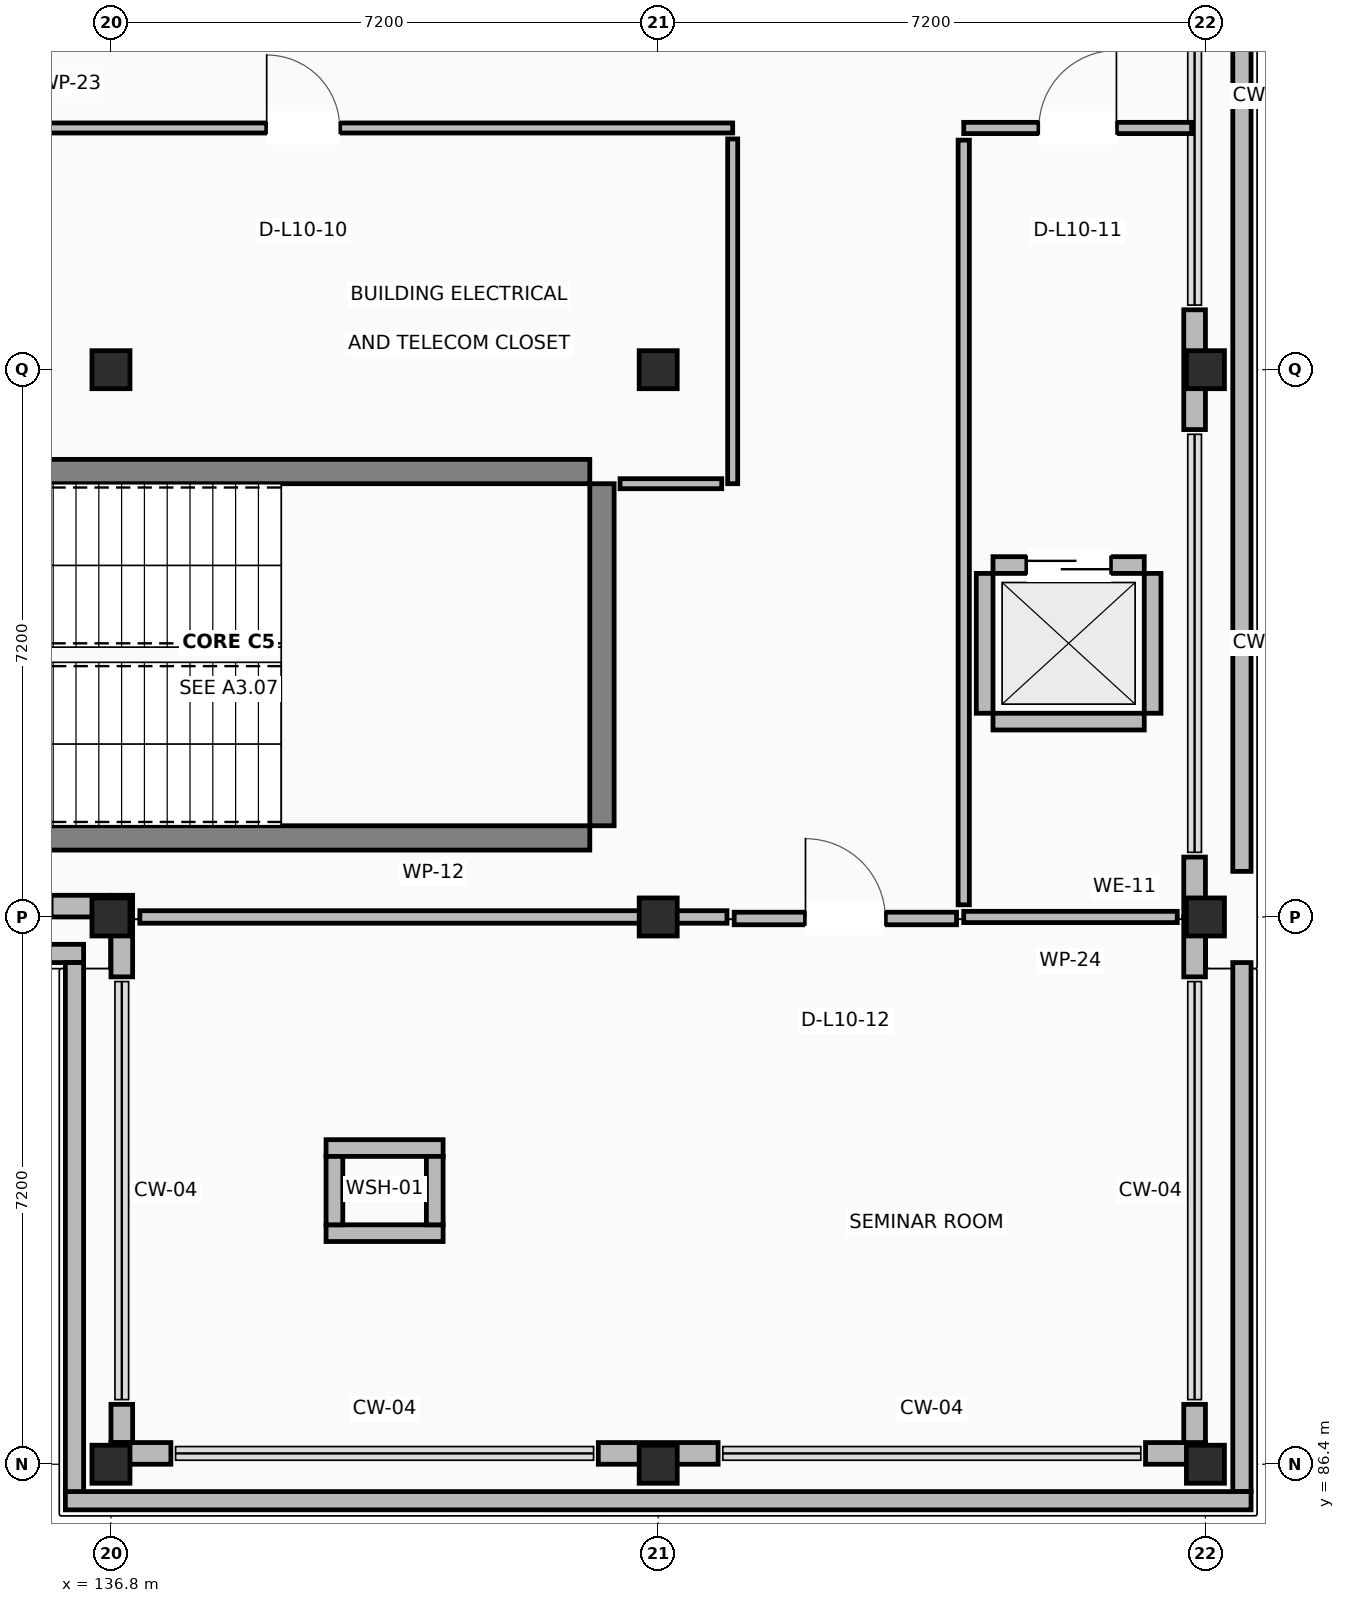
"""IFC4 building model, lengths in metres.
Left out: names, types, materials, properties, quantities, classifications, styles, units other than length and angle.
Written with IfcOpenShell. Run it as: python <this file> out.ifc"""

import sys

from ifc_helpers import new_model, si_unit, direction, frame, frame_2d, origin, origin_2d, place, context, subcontext, project, spatial, rectangle, extrude, element, fill, save


model = new_model("IFC4")
c1 = context("Model", 3, precision=1e-05, world=origin(), true_north=direction((0.0, 1.0)))
c2 = subcontext(c1, "Body", "Model", "MODEL_VIEW")
j1 = project(units=[si_unit("LENGTHUNIT", "METRE"), si_unit("PLANEANGLEUNIT", "RADIAN")], contexts=[c1])
p1 = place(None, origin())
s1 = spatial("IfcSite", under=j1, at=p1, CompositionType="ELEMENT")
p2 = place(p1, origin())
s2 = spatial("IfcBuilding", under=s1, at=p2, CompositionType="ELEMENT")
p3 = place(p2, frame((0.0, 0.0, 43.8)))
s3 = spatial("IfcBuildingStorey", under=s2, at=p3, CompositionType="ELEMENT", Elevation=43.8)
p4 = place(p3, frame((136.8, 86.4, 0.0), z_axis=(0.0, 0.0, 1.0), x_axis=(1.0, 0.0, 0.0)))
e1 = element("IfcColumn", 1, at=p4, inside=s3, PredefinedType="COLUMN", context=c2, shape_type="SweptSolid", body=[
    extrude(rectangle(XDim=0.5, YDim=0.5, at=origin_2d()), origin(), (0.0, 0.0, 1.0), 4.2),
])
for number, where, z_axis, x_axis in (
    (2, (136.8, 93.6, 0.0), (0.0, 0.0, 1.0), (1.0, 0.0, 0.0)),
    (3, (136.8, 100.8, 0.0), (0.0, 0.0, 1.0), (1.0, 0.0, 0.0)),
):
    element("IfcColumn", number, at=place(p3, frame(where, z_axis=z_axis, x_axis=x_axis)), inside=s3, PredefinedType="COLUMN", context=c2, shape_type="SweptSolid", body=[
        extrude(rectangle(XDim=0.5, YDim=0.5, at=origin_2d()), origin(), (0.0, 0.0, 1.0), 3.92),
    ])
p5 = place(p3, frame((144.0, 86.4, 0.0), z_axis=(0.0, 0.0, 1.0), x_axis=(1.0, 0.0, 0.0)))
e4 = element("IfcColumn", 4, at=p5, inside=s3, PredefinedType="COLUMN", context=c2, shape_type="SweptSolid", body=[
    extrude(rectangle(XDim=0.5, YDim=0.5, at=origin_2d()), origin(), (0.0, 0.0, 1.0), 4.2),
])
for number, where, z_axis, x_axis in (
    (5, (144.0, 93.6, 0.0), (0.0, 0.0, 1.0), (1.0, 0.0, 0.0)),
    (6, (144.0, 100.8, 0.0), (0.0, 0.0, 1.0), (1.0, 0.0, 0.0)),
):
    element("IfcColumn", number, at=place(p3, frame(where, z_axis=z_axis, x_axis=x_axis)), inside=s3, PredefinedType="COLUMN", context=c2, shape_type="SweptSolid", body=[
        extrude(rectangle(XDim=0.5, YDim=0.5, at=origin_2d()), origin(), (0.0, 0.0, 1.0), 3.92),
    ])
p6 = place(p3, frame((151.2, 86.4, 0.0), z_axis=(0.0, 0.0, 1.0), x_axis=(1.0, 0.0, 0.0)))
e7 = element("IfcColumn", 7, at=p6, inside=s3, PredefinedType="COLUMN", context=c2, shape_type="SweptSolid", body=[
    extrude(rectangle(XDim=0.5, YDim=0.5, at=origin_2d()), origin(), (0.0, 0.0, 1.0), 4.2),
])
for number, where, z_axis, x_axis in (
    (8, (151.2, 93.6, 0.0), (0.0, 0.0, 1.0), (1.0, 0.0, 0.0)),
    (9, (151.2, 100.8, 0.0), (0.0, 0.0, 1.0), (1.0, 0.0, 0.0)),
):
    element("IfcColumn", number, at=place(p3, frame(where, z_axis=z_axis, x_axis=x_axis)), inside=s3, PredefinedType="COLUMN", context=c2, shape_type="SweptSolid", body=[
        extrude(rectangle(XDim=0.5, YDim=0.5, at=origin_2d()), origin(), (0.0, 0.0, 1.0), 3.92),
    ])
for number, where, z_axis, x_axis in (
    (10, (133.6, 94.64, 0.0), (0.0, 0.0, 1.0), (1.0, 0.0, 0.0)),
    (11, (133.6, 99.46, 0.0), (0.0, 0.0, 1.0), (1.0, 0.0, 0.0)),
):
    element("IfcWall", number, at=place(p3, frame(where, z_axis=z_axis, x_axis=x_axis)), inside=s3, PredefinedType="SHEAR", context=c2, shape_type="SweptSolid", body=[
        extrude(rectangle(XDim=9.5, YDim=0.32, at=frame_2d((4.75, 0.0))), origin(), (0.0, 0.0, 1.0), 3.92),
    ])
p7 = place(p3, frame((143.26, 94.8, 0.0), z_axis=(0.0, 0.0, 1.0), x_axis=(0.0, 1.0, 0.0)))
e12 = element("IfcWall", 12, at=p7, inside=s3, PredefinedType="SHEAR", context=c2, shape_type="SweptSolid", body=[
    extrude(rectangle(XDim=4.5, YDim=0.32, at=frame_2d((2.25, 0.0))), origin(), (0.0, 0.0, 1.0), 3.92),
])
p8 = place(p3, frame((151.058, 93.6, 0.0), z_axis=(0.0, 0.0, 1.0), x_axis=(0.0, 1.0, 0.0)))
e13 = element("IfcWall", 13, at=p8, inside=s3, PredefinedType="STANDARD", context=c2, shape_type="SweptSolid", body=[
    extrude(rectangle(XDim=0.788, YDim=0.285, at=frame_2d((0.394, 0.0))), origin(), (0.0, 0.0, 1.0), 2.96),
])
p9 = place(p3, frame((151.058, 100.012, 0.0), z_axis=(0.0, 0.0, 1.0), x_axis=(0.0, 1.0, 0.0)))
e14 = element("IfcWall", 14, at=p9, inside=s3, PredefinedType="STANDARD", context=c2, shape_type="SweptSolid", body=[
    extrude(rectangle(XDim=1.576, YDim=0.285, at=frame_2d((0.788, 0.0))), origin(), (0.0, 0.0, 1.0), 2.96),
])
p10 = place(p3, frame((136.012, 93.742, 0.0), z_axis=(0.0, 0.0, 1.0), x_axis=(1.0, 0.0, 0.0)))
e15 = element("IfcWall", 15, at=p10, inside=s3, PredefinedType="STANDARD", context=c2, shape_type="SweptSolid", body=[
    extrude(rectangle(XDim=0.788, YDim=0.285, at=frame_2d((0.394, 0.0))), origin(), (0.0, 0.0, 1.0), 2.96),
])
p11 = place(p3, frame((136.942, 93.885, 0.0), z_axis=(0.0, 0.0, 1.0), x_axis=(0.0, -1.0, 0.0)))
e16 = element("IfcWall", 16, at=p11, inside=s3, PredefinedType="STANDARD", context=c2, shape_type="SweptSolid", body=[
    extrude(rectangle(XDim=1.073, YDim=0.285, at=frame_2d((0.537, 0.0))), origin(), (0.0, 0.0, 1.0), 2.96),
])
p12 = place(p3, frame((136.942, 87.188, 0.0), z_axis=(0.0, 0.0, 1.0), x_axis=(0.0, -1.0, 0.0)))
e17 = element("IfcWall", 17, at=p12, inside=s3, PredefinedType="STANDARD", context=c2, shape_type="SweptSolid", body=[
    extrude(rectangle(XDim=0.503, YDim=0.285, at=frame_2d((0.251, 0.0))), origin(), (0.0, 0.0, 1.0), 2.96),
])
p13 = place(p3, frame((136.8, 86.542, 0.0), z_axis=(0.0, 0.0, 1.0), x_axis=(1.0, 0.0, 0.0)))
e18 = element("IfcWall", 18, at=p13, inside=s3, PredefinedType="STANDARD", context=c2, shape_type="SweptSolid", body=[
    extrude(rectangle(XDim=0.788, YDim=0.285, at=frame_2d((0.394, 0.0))), origin(), (0.0, 0.0, 1.0), 2.96),
])
p14 = place(p3, frame((143.212, 86.542, 0.0), z_axis=(0.0, 0.0, 1.0), x_axis=(1.0, 0.0, 0.0)))
e19 = element("IfcWall", 19, at=p14, inside=s3, PredefinedType="STANDARD", context=c2, shape_type="SweptSolid", body=[
    extrude(rectangle(XDim=1.576, YDim=0.285, at=frame_2d((0.788, 0.0))), origin(), (0.0, 0.0, 1.0), 2.96),
])
p15 = place(p3, frame((150.412, 86.542, 0.0), z_axis=(0.0, 0.0, 1.0), x_axis=(1.0, 0.0, 0.0)))
e20 = element("IfcWall", 20, at=p15, inside=s3, PredefinedType="STANDARD", context=c2, shape_type="SweptSolid", body=[
    extrude(rectangle(XDim=0.788, YDim=0.285, at=frame_2d((0.394, 0.0))), origin(), (0.0, 0.0, 1.0), 2.96),
])
p16 = place(p3, frame((151.058, 86.685, 0.0), z_axis=(0.0, 0.0, 1.0), x_axis=(0.0, 1.0, 0.0)))
e21 = element("IfcWall", 21, at=p16, inside=s3, PredefinedType="STANDARD", context=c2, shape_type="SweptSolid", body=[
    extrude(rectangle(XDim=0.503, YDim=0.285, at=frame_2d((0.251, 0.0))), origin(), (0.0, 0.0, 1.0), 2.96),
])
p17 = place(p3, frame((151.058, 92.812, 0.0), z_axis=(0.0, 0.0, 1.0), x_axis=(0.0, 1.0, 0.0)))
e22 = element("IfcWall", 22, at=p17, inside=s3, PredefinedType="STANDARD", context=c2, shape_type="SweptSolid", body=[
    extrude(rectangle(XDim=0.788, YDim=0.285, at=frame_2d((0.394, 0.0))), origin(), (0.0, 0.0, 1.0), 2.96),
])
p18 = place(p3, frame((136.44, 93.12, 0.0), z_axis=(0.0, 0.0, 1.0), x_axis=(-1.0, 0.0, 0.0)))
e23 = element("IfcWall", 23, at=p18, inside=s3, PredefinedType="PARAPET", context=c2, shape_type="SweptSolid", body=[
    extrude(rectangle(XDim=43.44, YDim=0.24, at=frame_2d((21.72, 0.0))), origin(), (0.0, 0.0, 1.0), 1.12),
])
p19 = place(p3, frame((151.68, 115.56, 0.0), z_axis=(0.0, 0.0, 1.0), x_axis=(0.0, -1.0, 0.0)))
e24 = element("IfcWall", 24, at=p19, inside=s3, PredefinedType="PARAPET", context=c2, shape_type="SweptSolid", body=[
    extrude(rectangle(XDim=21.36, YDim=0.24, at=frame_2d((10.68, 0.0))), origin(), (0.0, 0.0, 1.0), 1.12),
])
p20 = place(p3, frame((151.68, 93.0, 0.0), z_axis=(0.0, 0.0, 1.0), x_axis=(0.0, -1.0, 0.0)))
e25 = element("IfcWall", 25, at=p20, inside=s3, PredefinedType="PARAPET", context=c2, shape_type="SweptSolid", body=[
    extrude(rectangle(XDim=6.96, YDim=0.24, at=frame_2d((3.48, 0.0))), origin(), (0.0, 0.0, 1.0), 1.12),
])
p21 = place(p3, frame((151.8, 85.92, 0.0), z_axis=(0.0, 0.0, 1.0), x_axis=(-1.0, 0.0, 0.0)))
e26 = element("IfcWall", 26, at=p21, inside=s3, PredefinedType="PARAPET", context=c2, shape_type="SweptSolid", body=[
    extrude(rectangle(XDim=15.6, YDim=0.24, at=frame_2d((7.8, 0.0))), origin(), (0.0, 0.0, 1.0), 1.12),
])
p22 = place(p3, frame((136.32, 86.04, 0.0), z_axis=(0.0, 0.0, 1.0), x_axis=(0.0, 1.0, 0.0)))
e27 = element("IfcWall", 27, at=p22, inside=s3, PredefinedType="PARAPET", context=c2, shape_type="SweptSolid", body=[
    extrude(rectangle(XDim=6.96, YDim=0.24, at=frame_2d((3.48, 0.0))), origin(), (0.0, 0.0, 1.0), 1.12),
])
p23 = place(p3, frame((148.405, 96.17, 0.0), z_axis=(0.0, 0.0, 1.0), x_axis=(1.0, 0.0, 0.0)))
e28 = element("IfcWall", 28, at=p23, inside=s3, PredefinedType="STANDARD", context=c2, shape_type="SweptSolid", body=[
    extrude(rectangle(XDim=1.99, YDim=0.22, at=frame_2d((0.995, 0.0))), origin(), (0.0, 0.0, 1.0), 2.96),
])
p24 = place(p3, frame((148.405, 98.23, 0.0), z_axis=(0.0, 0.0, 1.0), x_axis=(1.0, 0.0, 0.0)))
e29 = element("IfcWall", 29, at=p24, inside=s3, PredefinedType="STANDARD", context=c2, shape_type="SweptSolid", body=[
    extrude(rectangle(XDim=1.99, YDim=0.22, at=frame_2d((0.995, 0.0))), origin(), (0.0, 0.0, 1.0), 2.96),
])
p25 = place(p24, frame((0.445, 0.0, 0.0)))
e30 = element("IfcOpeningElement", 30, at=p25, cuts=e29, PredefinedType="OPENING", context=c2, shape_type="SweptSolid", body=[
    extrude(rectangle(XDim=1.1, YDim=2.15, at=frame_2d((0.55, 1.075))), frame((0.0, 0.12, 0.0), z_axis=(0.0, -1.0, 0.0), x_axis=(1.0, 0.0, 0.0)), (0.0, 0.0, 1.0), 0.24),
])
for number, where, z_axis, x_axis in (
    (31, (148.295, 96.28, 0.0), (0.0, 0.0, 1.0), (0.0, 1.0, 0.0)),
    (32, (150.505, 96.28, 0.0), (0.0, 0.0, 1.0), (0.0, 1.0, 0.0)),
):
    element("IfcWall", number, at=place(p3, frame(where, z_axis=z_axis, x_axis=x_axis)), inside=s3, PredefinedType="STANDARD", context=c2, shape_type="SweptSolid", body=[
        extrude(rectangle(XDim=1.84, YDim=0.22, at=frame_2d((0.92, 0.0))), origin(), (0.0, 0.0, 1.0), 2.96),
    ])
for number, where, z_axis, x_axis in (
    (33, (139.63, 89.44, 0.0), (0.0, 0.0, 1.0), (1.0, 0.0, 0.0)),
    (34, (139.63, 90.56, 0.0), (0.0, 0.0, 1.0), (1.0, 0.0, 0.0)),
):
    element("IfcWall", number, at=place(p3, frame(where, z_axis=z_axis, x_axis=x_axis)), inside=s3, PredefinedType="STANDARD", context=c2, shape_type="SweptSolid", body=[
        extrude(rectangle(XDim=1.54, YDim=0.22, at=frame_2d((0.77, 0.0))), origin(), (0.0, 0.0, 1.0), 2.96),
    ])
for number, where, z_axis, x_axis in (
    (35, (139.74, 89.55, 0.0), (0.0, 0.0, 1.0), (0.0, 1.0, 0.0)),
    (36, (141.06, 89.55, 0.0), (0.0, 0.0, 1.0), (0.0, 1.0, 0.0)),
):
    element("IfcWall", number, at=place(p3, frame(where, z_axis=z_axis, x_axis=x_axis)), inside=s3, PredefinedType="STANDARD", context=c2, shape_type="SweptSolid", body=[
        extrude(rectangle(XDim=0.9, YDim=0.22, at=frame_2d((0.45, 0.0))), origin(), (0.0, 0.0, 1.0), 2.96),
    ])
p26 = place(p3, frame((133.678, 103.98, 0.0), z_axis=(0.0, 0.0, 1.0), x_axis=(1.0, 0.0, 0.0)))
e37 = element("IfcWall", 37, at=p26, inside=s3, PredefinedType="PARTITIONING", context=c2, shape_type="SweptSolid", body=[
    extrude(rectangle(XDim=11.302, YDim=0.132, at=frame_2d((5.651, 0.0))), origin(), (0.0, 0.0, 1.0), 2.96),
])
p27 = place(p26, frame((5.171, 0.0, 0.0)))
e38 = element("IfcOpeningElement", 38, at=p27, cuts=e37, PredefinedType="OPENING", context=c2, shape_type="SweptSolid", body=[
    extrude(rectangle(XDim=0.96, YDim=2.1, at=frame_2d((0.48, 1.05))), frame((0.0, 0.076, 0.0), z_axis=(0.0, -1.0, 0.0), x_axis=(1.0, 0.0, 0.0)), (0.0, 0.0, 1.0), 0.152),
])
p28 = place(p3, frame((144.98, 103.836, 0.0), z_axis=(0.0, 0.0, 1.0), x_axis=(0.0, -1.0, 0.0)))
e39 = element("IfcWall", 39, at=p28, inside=s3, PredefinedType="PARTITIONING", context=c2, shape_type="SweptSolid", body=[
    extrude(rectangle(XDim=4.536, YDim=0.132, at=frame_2d((2.268, 0.0))), origin(), (0.0, 0.0, 1.0), 2.96),
])
p29 = place(p3, frame((144.836, 99.3, 0.0), z_axis=(0.0, 0.0, 1.0), x_axis=(-1.0, 0.0, 0.0)))
e40 = element("IfcWall", 40, at=p29, inside=s3, PredefinedType="PARTITIONING", context=c2, shape_type="SweptSolid", body=[
    extrude(rectangle(XDim=1.338, YDim=0.132, at=frame_2d((0.669, 0.0))), origin(), (0.0, 0.0, 1.0), 2.96),
])
p30 = place(p3, frame((148.02, 103.98, 0.0), z_axis=(0.0, 0.0, 1.0), x_axis=(1.0, 0.0, 0.0)))
e41 = element("IfcWall", 41, at=p30, inside=s3, PredefinedType="PARTITIONING", context=c2, shape_type="SweptSolid", body=[
    extrude(rectangle(XDim=2.998, YDim=0.148, at=frame_2d((1.499, 0.0))), origin(), (0.0, 0.0, 1.0), 2.96),
])
p31 = place(p30, frame((0.989, 0.0, 0.0)))
e42 = element("IfcOpeningElement", 42, at=p31, cuts=e41, PredefinedType="OPENING", context=c2, shape_type="SweptSolid", body=[
    extrude(rectangle(XDim=1.02, YDim=2.15, at=frame_2d((0.51, 1.075))), frame((0.0, 0.084, 0.0), z_axis=(0.0, -1.0, 0.0), x_axis=(1.0, 0.0, 0.0)), (0.0, 0.0, 1.0), 0.168),
])
p32 = place(p3, frame((150.829, 93.6, 0.0), z_axis=(0.0, 0.0, 1.0), x_axis=(-1.0, 0.0, 0.0)))
e43 = element("IfcWall", 43, at=p32, inside=s3, PredefinedType="PARTITIONING", context=c2, shape_type="SweptSolid", body=[
    extrude(rectangle(XDim=2.809, YDim=0.148, at=frame_2d((1.405, 0.0))), origin(), (0.0, 0.0, 1.0), 2.96),
])
p33 = place(p3, frame((148.02, 93.76, 0.0), z_axis=(0.0, 0.0, 1.0), x_axis=(0.0, 1.0, 0.0)))
e44 = element("IfcWall", 44, at=p33, inside=s3, PredefinedType="PARTITIONING", context=c2, shape_type="SweptSolid", body=[
    extrude(rectangle(XDim=10.06, YDim=0.148, at=frame_2d((5.03, 0.0))), origin(), (0.0, 0.0, 1.0), 2.96),
])
p34 = place(p3, frame((145.0, 93.58, 0.0), z_axis=(0.0, 0.0, 1.0), x_axis=(1.0, 0.0, 0.0)))
e45 = element("IfcWall", 45, at=p34, inside=s3, PredefinedType="PARTITIONING", context=c2, shape_type="SweptSolid", body=[
    extrude(rectangle(XDim=2.925, YDim=0.165, at=frame_2d((1.462, 0.0))), origin(), (0.0, 0.0, 1.0), 2.96),
])
p35 = place(p34, frame((0.938, 0.0, 0.0)))
e46 = element("IfcOpeningElement", 46, at=p35, cuts=e45, PredefinedType="OPENING", context=c2, shape_type="SweptSolid", body=[
    extrude(rectangle(XDim=1.05, YDim=2.15, at=frame_2d((0.525, 1.075))), frame((0.0, 0.093, 0.0), z_axis=(0.0, -1.0, 0.0), x_axis=(1.0, 0.0, 0.0)), (0.0, 0.0, 1.0), 0.185),
])
p36 = place(p3, frame((137.18, 93.6, 0.0), z_axis=(0.0, 0.0, 1.0), x_axis=(1.0, 0.0, 0.0)))
e47 = element("IfcWall", 47, at=p36, inside=s3, PredefinedType="PARTITIONING", context=c2, shape_type="SweptSolid", body=[
    extrude(rectangle(XDim=7.725, YDim=0.165, at=frame_2d((3.863, 0.0))), origin(), (0.0, 0.0, 1.0), 2.96),
])
p37 = place(p25, origin())
e48 = element("IfcDoor", 48, at=p37, inside=s3, OperationType="SLIDING_TO_LEFT", PredefinedType="DOOR", context=c2, shape_type="SweptSolid", body=[
    extrude(rectangle(XDim=1.1, YDim=2.15, at=frame_2d((0.55, 1.075))), frame((0.0, 0.025, 0.0), z_axis=(0.0, -1.0, 0.0), x_axis=(1.0, 0.0, 0.0)), (0.0, 0.0, 1.0), 0.05),
])
fill(e30, e48)
p38 = place(p27, origin())
e49 = element("IfcDoor", 49, at=p38, inside=s3, OperationType="SINGLE_SWING_LEFT", PredefinedType="DOOR", context=c2, shape_type="SweptSolid", body=[
    extrude(rectangle(XDim=0.96, YDim=2.1, at=frame_2d((0.48, 1.05))), frame((0.0, 0.025, 0.0), z_axis=(0.0, -1.0, 0.0), x_axis=(1.0, 0.0, 0.0)), (0.0, 0.0, 1.0), 0.05),
])
fill(e38, e49)
p39 = place(p31, origin())
e50 = element("IfcDoor", 50, at=p39, inside=s3, OperationType="SINGLE_SWING_RIGHT", PredefinedType="DOOR", context=c2, shape_type="SweptSolid", body=[
    extrude(rectangle(XDim=1.02, YDim=2.15, at=frame_2d((0.51, 1.075))), frame((0.0, 0.025, 0.0), z_axis=(0.0, -1.0, 0.0), x_axis=(1.0, 0.0, 0.0)), (0.0, 0.0, 1.0), 0.05),
])
fill(e42, e50)
p40 = place(p35, origin())
e51 = element("IfcDoor", 51, at=p40, inside=s3, OperationType="SINGLE_SWING_LEFT", PredefinedType="DOOR", context=c2, shape_type="SweptSolid", body=[
    extrude(rectangle(XDim=1.05, YDim=2.15, at=frame_2d((0.525, 1.075))), frame((0.0, 0.025, 0.0), z_axis=(0.0, -1.0, 0.0), x_axis=(1.0, 0.0, 0.0)), (0.0, 0.0, 1.0), 0.05),
])
fill(e46, e51)
save(model, sys.argv[1])
